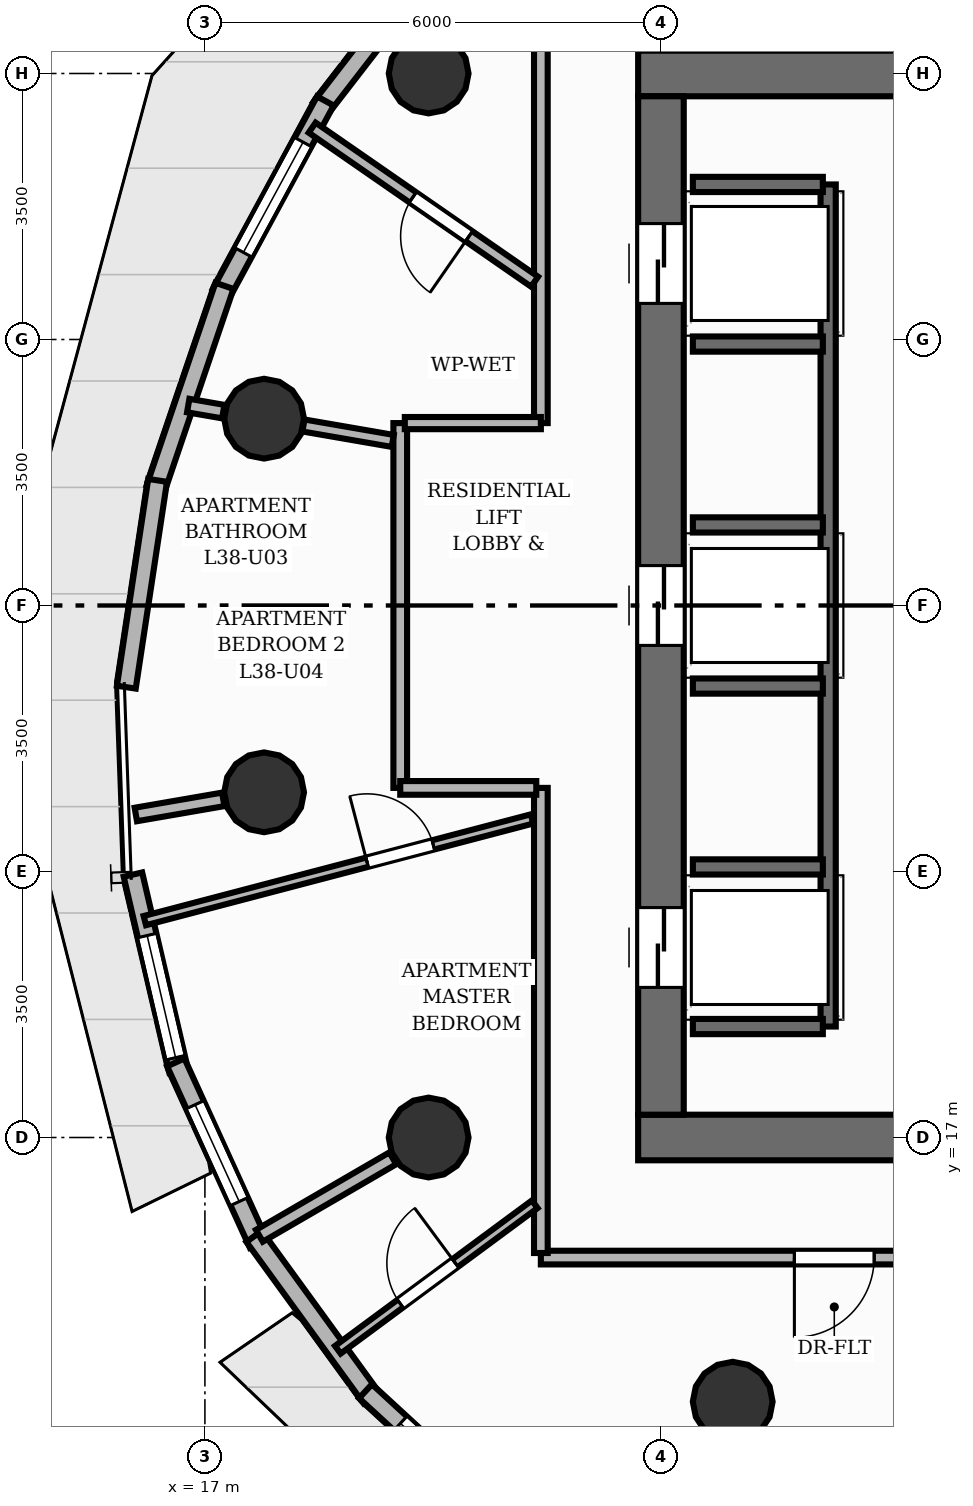
"""IFC4 building model, lengths in metres.
Left out: names, types, materials, properties, quantities, classifications, styles, units other than length and angle.
Written with IfcOpenShell. Run it as: python <this file> out.ifc"""

import sys

from ifc_helpers import new_model, si_unit, direction, frame, frame_2d, origin, origin_2d, place, context, subcontext, project, spatial, rectangle, circle, extrude, element, fill, save


model = new_model("IFC4")
c1 = context("Model", 3, precision=1e-05, world=origin(), true_north=direction((0.0, 1.0)))
c2 = subcontext(c1, "Body", "Model", "MODEL_VIEW")
j1 = project(units=[si_unit("LENGTHUNIT", "METRE"), si_unit("PLANEANGLEUNIT", "RADIAN")], contexts=[c1])
p1 = place(None, origin())
s1 = spatial("IfcSite", under=j1, at=p1, CompositionType="ELEMENT")
p2 = place(p1, origin())
s2 = spatial("IfcBuilding", under=s1, at=p2, CompositionType="ELEMENT")
p3 = place(p2, frame((0.0, 0.0, 129.76)))
s3 = spatial("IfcBuildingStorey", under=s2, at=p3, CompositionType="ELEMENT", Elevation=129.76)
p4 = place(p3, frame((22.7, 17.0, 0.0), z_axis=(0.0, 0.0, 1.0), x_axis=(1.0, 0.0, 0.0)))
e1 = element("IfcWall", 1, at=p4, inside=s3, PredefinedType="SHEAR", context=c2, shape_type="SweptSolid", body=[
    extrude(rectangle(XDim=15.1, YDim=0.6, at=frame_2d((7.55, 0.0))), origin(), (0.0, 0.0, 1.0), 3.2),
])
p5 = place(p4, frame((5.8, 0.0, 0.0)))
e2 = element("IfcOpeningElement", 2, at=p5, cuts=e1, PredefinedType="OPENING", context=c2, shape_type="SweptSolid", body=[
    extrude(rectangle(XDim=1.1, YDim=2.15, at=frame_2d((0.55, 1.075))), frame((0.0, 0.31, 0.0), z_axis=(0.0, -1.0, 0.0), x_axis=(1.0, 0.0, 0.0)), (0.0, 0.0, 1.0), 0.62),
])
p6 = place(p4, frame((9.35, 0.0, 0.0)))
e3 = element("IfcOpeningElement", 3, at=p6, cuts=e1, PredefinedType="OPENING", context=c2, shape_type="SweptSolid", body=[
    extrude(rectangle(XDim=0.9, YDim=2.1, at=frame_2d((0.45, 1.05))), frame((0.0, 0.31, 0.0), z_axis=(0.0, -1.0, 0.0), x_axis=(1.0, 0.0, 0.0)), (0.0, 0.0, 1.0), 0.62),
])
p7 = place(p3, frame((22.7, 31.0, 0.0), z_axis=(0.0, 0.0, 1.0), x_axis=(1.0, 0.0, 0.0)))
e4 = element("IfcWall", 4, at=p7, inside=s3, PredefinedType="SHEAR", context=c2, shape_type="SweptSolid", body=[
    extrude(rectangle(XDim=15.1, YDim=0.6, at=frame_2d((7.55, 0.0))), origin(), (0.0, 0.0, 1.0), 3.2),
])
p8 = place(p7, frame((11.7, 0.0, 0.0)))
e5 = element("IfcOpeningElement", 5, at=p8, cuts=e4, PredefinedType="OPENING", context=c2, shape_type="SweptSolid", body=[
    extrude(rectangle(XDim=1.1, YDim=2.15, at=frame_2d((0.55, 1.075))), frame((0.0, 0.31, 0.0), z_axis=(0.0, -1.0, 0.0), x_axis=(1.0, 0.0, 0.0)), (0.0, 0.0, 1.0), 0.62),
])
p9 = place(p3, frame((23.0, 17.3, 0.0), z_axis=(0.0, 0.0, 1.0), x_axis=(0.0, 1.0, 0.0)))
e6 = element("IfcWall", 6, at=p9, inside=s3, PredefinedType="SHEAR", context=c2, shape_type="SweptSolid", body=[
    extrude(rectangle(XDim=13.4, YDim=0.6, at=frame_2d((6.7, 0.0))), origin(), (0.0, 0.0, 1.0), 3.2),
])
p10 = place(p9, frame((1.675, 0.0, 0.0)))
e7 = element("IfcOpeningElement", 7, at=p10, cuts=e6, PredefinedType="OPENING", context=c2, shape_type="SweptSolid", body=[
    extrude(rectangle(XDim=1.05, YDim=2.15, at=frame_2d((0.525, 1.075))), frame((0.0, 0.31, 0.0), z_axis=(0.0, -1.0, 0.0), x_axis=(1.0, 0.0, 0.0)), (0.0, 0.0, 1.0), 0.62),
])
p11 = place(p9, frame((6.175, 0.0, 0.0)))
e8 = element("IfcOpeningElement", 8, at=p11, cuts=e6, PredefinedType="OPENING", context=c2, shape_type="SweptSolid", body=[
    extrude(rectangle(XDim=1.05, YDim=2.15, at=frame_2d((0.525, 1.075))), frame((0.0, 0.31, 0.0), z_axis=(0.0, -1.0, 0.0), x_axis=(1.0, 0.0, 0.0)), (0.0, 0.0, 1.0), 0.62),
])
p12 = place(p9, frame((10.675, 0.0, 0.0)))
e9 = element("IfcOpeningElement", 9, at=p12, cuts=e6, PredefinedType="OPENING", context=c2, shape_type="SweptSolid", body=[
    extrude(rectangle(XDim=1.05, YDim=2.15, at=frame_2d((0.525, 1.075))), frame((0.0, 0.31, 0.0), z_axis=(0.0, -1.0, 0.0), x_axis=(1.0, 0.0, 0.0)), (0.0, 0.0, 1.0), 0.62),
])
for number, where, z_axis, x_axis in (
    (10, (19.944, 31.0, 0.0), (0.0, 0.0, 1.0), (1.0, 0.0, 0.0)),
    (11, (17.779, 26.458, 0.0), (0.0, 0.0, 1.0), (1.0, 0.0, 0.0)),
    (12, (17.779, 21.542, 0.0), (0.0, 0.0, 1.0), (1.0, 0.0, 0.0)),
    (13, (19.944, 17.0, 0.0), (0.0, 0.0, 1.0), (1.0, 0.0, 0.0)),
    (14, (23.944, 13.523, 0.0), (0.0, 0.0, 1.0), (1.0, 0.0, 0.0)),
):
    element("IfcColumn", number, at=place(p3, frame(where, z_axis=z_axis, x_axis=x_axis)), inside=s3, PredefinedType="COLUMN", context=c2, shape_type="SweptSolid", body=[
        extrude(circle(Radius=0.525, at=origin_2d()), origin(), (0.0, 0.0, 1.0), 3.2),
    ])
p13 = place(p3, frame((18.525, 30.546, 0.0), z_axis=(0.0, 0.0, 1.0), x_axis=(0.611416743811, 0.791308767415, 0.0)))
e15 = element("IfcWall", 15, at=p13, inside=s3, PredefinedType="SOLIDWALL", context=c2, shape_type="SweptSolid", body=[
    extrude(rectangle(XDim=2.937, YDim=0.25, at=frame_2d((1.468, 0.0))), origin(), (0.0, 0.0, 1.0), 2.96),
])
p14 = place(p3, frame((17.213, 28.104, 0.0), z_axis=(0.0, 0.0, 1.0), x_axis=(0.476018404115, 0.879435318226, 0.0)))
e16 = element("IfcWall", 16, at=p14, inside=s3, PredefinedType="SOLIDWALL", context=c2, shape_type="SweptSolid", body=[
    extrude(rectangle(XDim=2.882, YDim=0.25, at=frame_2d((1.441, 0.0))), origin(), (0.0, 0.0, 1.0), 2.96),
])
p15 = place(p14, frame((0.616, 0.0, 0.85)))
e17 = element("IfcOpeningElement", 17, at=p15, cuts=e16, PredefinedType="OPENING", context=c2, shape_type="SweptSolid", body=[
    extrude(rectangle(XDim=1.65, YDim=1.55, at=frame_2d((0.825, 0.775))), frame((0.0, 0.135, 0.0), z_axis=(0.0, -1.0, 0.0), x_axis=(1.0, 0.0, 0.0)), (0.0, 0.0, 1.0), 0.27),
])
p16 = place(p3, frame((16.351, 25.538, 0.0), z_axis=(0.0, 0.0, 1.0), x_axis=(0.321473951892, 0.946918422175, 0.0)))
e18 = element("IfcWall", 18, at=p16, inside=s3, PredefinedType="SOLIDWALL", context=c2, shape_type="SweptSolid", body=[
    extrude(rectangle(XDim=2.818, YDim=0.25, at=frame_2d((1.409, 0.0))), origin(), (0.0, 0.0, 1.0), 2.96),
])
p17 = place(p3, frame((15.966, 22.925, 0.0), z_axis=(0.0, 0.0, 1.0), x_axis=(0.149576734229, 0.988750120393, 0.0)))
e19 = element("IfcWall", 19, at=p17, inside=s3, PredefinedType="SOLIDWALL", context=c2, shape_type="SweptSolid", body=[
    extrude(rectangle(XDim=2.752, YDim=0.25, at=frame_2d((1.376, 0.0))), origin(), (0.0, 0.0, 1.0), 2.96),
])
p18 = place(p3, frame((16.654, 17.88, 0.0), z_axis=(0.0, 0.0, 1.0), x_axis=(-0.226865331245, 0.973926137589, 0.0)))
e20 = element("IfcWall", 20, at=p18, inside=s3, PredefinedType="SOLIDWALL", context=c2, shape_type="SweptSolid", body=[
    extrude(rectangle(XDim=2.648, YDim=0.25, at=frame_2d((1.324, 0.0))), origin(), (0.0, 0.0, 1.0), 2.96),
])
p19 = place(p18, frame((0.175, 0.0, 0.85)))
e21 = element("IfcOpeningElement", 21, at=p19, cuts=e20, PredefinedType="OPENING", context=c2, shape_type="SweptSolid", body=[
    extrude(rectangle(XDim=1.65, YDim=1.55, at=frame_2d((0.825, 0.775))), frame((0.0, 0.135, 0.0), z_axis=(0.0, -1.0, 0.0), x_axis=(1.0, 0.0, 0.0)), (0.0, 0.0, 1.0), 0.27),
])
p20 = place(p3, frame((17.705, 15.6, 0.0), z_axis=(0.0, 0.0, 1.0), x_axis=(-0.41458087789, 0.910012470073, 0.0)))
e22 = element("IfcWall", 22, at=p20, inside=s3, PredefinedType="SOLIDWALL", context=c2, shape_type="SweptSolid", body=[
    extrude(rectangle(XDim=2.624, YDim=0.25, at=frame_2d((1.312, 0.0))), origin(), (0.0, 0.0, 1.0), 2.96),
])
p21 = place(p20, frame((0.612, 0.0, 0.85)))
e23 = element("IfcOpeningElement", 23, at=p21, cuts=e22, PredefinedType="OPENING", context=c2, shape_type="SweptSolid", body=[
    extrude(rectangle(XDim=1.4, YDim=1.55, at=frame_2d((0.7, 0.775))), frame((0.0, 0.135, 0.0), z_axis=(0.0, -1.0, 0.0), x_axis=(1.0, 0.0, 0.0)), (0.0, 0.0, 1.0), 0.27),
])
p22 = place(p3, frame((19.189, 13.576, 0.0), z_axis=(0.0, 0.0, 1.0), x_axis=(-0.587574137145, 0.80917033643, 0.0)))
e24 = element("IfcWall", 24, at=p22, inside=s3, PredefinedType="SOLIDWALL", context=c2, shape_type="SweptSolid", body=[
    extrude(rectangle(XDim=2.624, YDim=0.25, at=frame_2d((1.312, 0.0))), origin(), (0.0, 0.0, 1.0), 2.96),
])
p23 = place(p3, frame((21.061, 11.868, 0.0), z_axis=(0.0, 0.0, 1.0), x_axis=(-0.73572884951, 0.677276206579, 0.0)))
e25 = element("IfcWall", 25, at=p23, inside=s3, PredefinedType="SOLIDWALL", context=c2, shape_type="SweptSolid", body=[
    extrude(rectangle(XDim=2.648, YDim=0.25, at=frame_2d((1.324, 0.0))), origin(), (0.0, 0.0, 1.0), 2.96),
])
p24 = place(p23, frame((0.624, 0.0, 0.85)))
e26 = element("IfcOpeningElement", 26, at=p24, cuts=e25, PredefinedType="OPENING", context=c2, shape_type="SweptSolid", body=[
    extrude(rectangle(XDim=1.4, YDim=1.55, at=frame_2d((0.7, 0.775))), frame((0.0, 0.135, 0.0), z_axis=(0.0, -1.0, 0.0), x_axis=(1.0, 0.0, 0.0)), (0.0, 0.0, 1.0), 0.27),
])
p25 = place(p3, frame((25.2, 18.46, 0.0), z_axis=(0.0, 0.0, 1.0), x_axis=(0.0, 1.0, 0.0)))
e27 = element("IfcWall", 27, at=p25, inside=s3, PredefinedType="SHEAR", context=c2, shape_type="SweptSolid", body=[
    extrude(rectangle(XDim=11.08, YDim=0.2, at=frame_2d((5.54, 0.0))), origin(), (0.0, 0.0, 1.0), 3.2),
])
for number, where, z_axis, x_axis in (
    (28, (23.42, 18.46, 0.0), (0.0, 0.0, 1.0), (1.0, 0.0, 0.0)),
    (29, (23.42, 29.54, 0.0), (0.0, 0.0, 1.0), (1.0, 0.0, 0.0)),
    (30, (23.42, 20.56, 0.0), (0.0, 0.0, 1.0), (1.0, 0.0, 0.0)),
    (31, (23.42, 22.94, 0.0), (0.0, 0.0, 1.0), (1.0, 0.0, 0.0)),
    (32, (23.42, 25.06, 0.0), (0.0, 0.0, 1.0), (1.0, 0.0, 0.0)),
    (33, (23.42, 27.44, 0.0), (0.0, 0.0, 1.0), (1.0, 0.0, 0.0)),
):
    element("IfcWall", number, at=place(p3, frame(where, z_axis=z_axis, x_axis=x_axis)), inside=s3, PredefinedType="SHEAR", context=c2, shape_type="SweptSolid", body=[
        extrude(rectangle(XDim=1.71, YDim=0.2, at=frame_2d((0.855, 0.0))), origin(), (0.0, 0.0, 1.0), 3.2),
    ])
p26 = place(p3, frame((17.242, 26.551, 0.0), z_axis=(0.0, 0.0, 1.0), x_axis=(-0.985345448397, 0.170570651999, 0.0)))
e34 = element("IfcWall", 34, at=p26, inside=s3, PredefinedType="PARTITIONING", context=c2, shape_type="SweptSolid", body=[
    extrude(rectangle(XDim=0.468, YDim=0.18, at=frame_2d((0.234, 0.0))), origin(), (0.0, 0.0, 1.0), 2.336),
])
p27 = place(p3, frame((17.242, 21.449, 0.0), z_axis=(0.0, 0.0, 1.0), x_axis=(-0.98537549431, -0.170396992969, 0.0)))
e35 = element("IfcWall", 35, at=p27, inside=s3, PredefinedType="PARTITIONING", context=c2, shape_type="SweptSolid", body=[
    extrude(rectangle(XDim=1.168, YDim=0.18, at=frame_2d((0.584, 0.0))), origin(), (0.0, 0.0, 1.0), 2.336),
])
p28 = place(p3, frame((19.472, 16.726, 0.0), z_axis=(0.0, 0.0, 1.0), x_axis=(-0.86481084581, -0.502097800203, 0.0)))
e36 = element("IfcWall", 36, at=p28, inside=s3, PredefinedType="PARTITIONING", context=c2, shape_type="SweptSolid", body=[
    extrude(rectangle(XDim=2.03, YDim=0.18, at=frame_2d((1.015, 0.0))), origin(), (0.0, 0.0, 1.0), 2.336),
])
p29 = place(p3, frame((21.42, 26.4, 0.0), z_axis=(0.0, 0.0, 1.0), x_axis=(0.0, 1.0, 0.0)))
e37 = element("IfcWall", 37, at=p29, inside=s3, PredefinedType="PARTITIONING", context=c2, shape_type="SweptSolid", body=[
    extrude(rectangle(XDim=6.12, YDim=0.18, at=frame_2d((3.06, 0.0))), origin(), (0.0, 0.0, 1.0), 2.955),
])
p30 = place(p3, frame((19.57, 21.6, 0.0), z_axis=(0.0, 0.0, 1.0), x_axis=(0.0, 1.0, 0.0)))
e38 = element("IfcWall", 38, at=p30, inside=s3, PredefinedType="PARTITIONING", context=c2, shape_type="SweptSolid", body=[
    extrude(rectangle(XDim=4.8, YDim=0.18, at=frame_2d((2.4, 0.0))), origin(), (0.0, 0.0, 1.0), 2.955),
])
p31 = place(p3, frame((19.63, 26.4, 0.0), z_axis=(0.0, 0.0, 1.0), x_axis=(1.0, 0.0, 0.0)))
e39 = element("IfcWall", 39, at=p31, inside=s3, PredefinedType="PLUMBINGWALL", context=c2, shape_type="SweptSolid", body=[
    extrude(rectangle(XDim=1.79, YDim=0.16, at=frame_2d((0.895, 0.0))), origin(), (0.0, 0.0, 1.0), 2.955),
])
p32 = place(p3, frame((29.141, 15.42, 0.0), z_axis=(0.0, 0.0, 1.0), x_axis=(-1.0, 0.0, 0.0)))
e40 = element("IfcWall", 40, at=p32, inside=s3, PredefinedType="PARTITIONING", context=c2, shape_type="SweptSolid", body=[
    extrude(rectangle(XDim=7.721, YDim=0.18, at=frame_2d((3.861, 0.0))), origin(), (0.0, 0.0, 1.0), 2.955),
])
p33 = place(p32, frame((3.336, 0.0, 0.0)))
e41 = element("IfcOpeningElement", 41, at=p33, cuts=e40, PredefinedType="OPENING", context=c2, shape_type="SweptSolid", body=[
    extrude(rectangle(XDim=1.05, YDim=2.15, at=frame_2d((0.525, 1.075))), frame((0.0, 0.1, 0.0), z_axis=(0.0, -1.0, 0.0), x_axis=(1.0, 0.0, 0.0)), (0.0, 0.0, 1.0), 0.2),
])
p34 = place(p3, frame((21.42, 15.48, 0.0), z_axis=(0.0, 0.0, 1.0), x_axis=(0.0, 1.0, 0.0)))
e42 = element("IfcWall", 42, at=p34, inside=s3, PredefinedType="PARTITIONING", context=c2, shape_type="SweptSolid", body=[
    extrude(rectangle(XDim=6.12, YDim=0.18, at=frame_2d((3.06, 0.0))), origin(), (0.0, 0.0, 1.0), 2.955),
])
p35 = place(p3, frame((21.36, 21.6, 0.0), z_axis=(0.0, 0.0, 1.0), x_axis=(-1.0, 0.0, 0.0)))
e43 = element("IfcWall", 43, at=p35, inside=s3, PredefinedType="PARTITIONING", context=c2, shape_type="SweptSolid", body=[
    extrude(rectangle(XDim=1.79, YDim=0.18, at=frame_2d((0.895, 0.0))), origin(), (0.0, 0.0, 1.0), 2.336),
])
p36 = place(p3, frame((21.338, 28.26, 0.0), z_axis=(0.0, 0.0, 1.0), x_axis=(-0.822095882312, 0.569349067168, 0.0)))
e44 = element("IfcWall", 44, at=p36, inside=s3, PredefinedType="PLUMBINGWALL", context=c2, shape_type="SweptSolid", body=[
    extrude(rectangle(XDim=3.56, YDim=0.16, at=frame_2d((1.78, 0.0))), origin(), (0.0, 0.0, 1.0), 2.692),
])
p37 = place(p36, frame((1.05, 0.0, 0.0)))
e45 = element("IfcOpeningElement", 45, at=p37, cuts=e44, PredefinedType="OPENING", context=c2, shape_type="SweptSolid", body=[
    extrude(rectangle(XDim=0.9, YDim=2.1, at=frame_2d((0.45, 1.05))), frame((0.0, 0.09, 0.0), z_axis=(0.0, -1.0, 0.0), x_axis=(1.0, 0.0, 0.0)), (0.0, 0.0, 1.0), 0.18),
])
p38 = place(p3, frame((19.471, 26.166, 0.0), z_axis=(0.0, 0.0, 1.0), x_axis=(-0.985385550807, 0.170338827815, 0.0)))
e46 = element("IfcWall", 46, at=p38, inside=s3, PredefinedType="PLUMBINGWALL", context=c2, shape_type="SweptSolid", body=[
    extrude(rectangle(XDim=1.192, YDim=0.16, at=frame_2d((0.596, 0.0))), origin(), (0.0, 0.0, 1.0), 2.336),
])
p39 = place(p3, frame((29.068, 15.335, 0.0), z_axis=(0.0, 0.0, 1.0), x_axis=(-0.534879638081, -0.844928264864, 0.0)))
e47 = element("IfcWall", 47, at=p39, inside=s3, PredefinedType="PLUMBINGWALL", context=c2, shape_type="SweptSolid", body=[
    extrude(rectangle(XDim=6.669, YDim=0.16, at=frame_2d((3.335, 0.0))), origin(), (0.0, 0.0, 1.0), 2.692),
])
p40 = place(p39, frame((2.885, 0.0, 0.0)))
e48 = element("IfcOpeningElement", 48, at=p40, cuts=e47, PredefinedType="OPENING", context=c2, shape_type="SweptSolid", body=[
    extrude(rectangle(XDim=0.9, YDim=2.1, at=frame_2d((0.45, 1.05))), frame((0.0, 0.09, 0.0), z_axis=(0.0, -1.0, 0.0), x_axis=(1.0, 0.0, 0.0)), (0.0, 0.0, 1.0), 0.18),
])
p41 = place(p3, frame((18.749, 14.207, 0.0), z_axis=(0.0, 0.0, 1.0), x_axis=(0.804182442208, 0.594382536456, 0.0)))
e49 = element("IfcWall", 49, at=p41, inside=s3, PredefinedType="PARTITIONING", context=c2, shape_type="SweptSolid", body=[
    extrude(rectangle(XDim=3.221, YDim=0.125, at=frame_2d((1.611, 0.0))), origin(), (0.0, 0.0, 1.0), 2.955),
])
p42 = place(p41, frame((1.021, 0.0, 0.0)))
e50 = element("IfcOpeningElement", 50, at=p42, cuts=e49, PredefinedType="OPENING", context=c2, shape_type="SweptSolid", body=[
    extrude(rectangle(XDim=0.9, YDim=2.1, at=frame_2d((0.45, 1.05))), frame((0.0, 0.073, 0.0), z_axis=(0.0, -1.0, 0.0), x_axis=(1.0, 0.0, 0.0)), (0.0, 0.0, 1.0), 0.145),
])
p43 = place(p3, frame((16.209, 19.854, 0.0), z_axis=(0.0, 0.0, 1.0), x_axis=(0.967214885104, 0.253959378707, 0.0)))
e51 = element("IfcWall", 51, at=p43, inside=s3, PredefinedType="PARTITIONING", context=c2, shape_type="SweptSolid", body=[
    extrude(rectangle(XDim=5.267, YDim=0.125, at=frame_2d((2.634, 0.0))), origin(), (0.0, 0.0, 1.0), 2.955),
])
p44 = place(p43, frame((3.024, 0.0, 0.0)))
e52 = element("IfcOpeningElement", 52, at=p44, cuts=e51, PredefinedType="OPENING", context=c2, shape_type="SweptSolid", body=[
    extrude(rectangle(XDim=0.9, YDim=2.1, at=frame_2d((0.45, 1.05))), frame((0.0, 0.073, 0.0), z_axis=(0.0, -1.0, 0.0), x_axis=(1.0, 0.0, 0.0)), (0.0, 0.0, 1.0), 0.145),
])
p45 = place(p15, origin())
e53 = element("IfcWindow", 53, at=p45, inside=s3, PartitioningType="SINGLE_PANEL", PredefinedType="WINDOW", context=c2, shape_type="SweptSolid", body=[
    extrude(rectangle(XDim=1.65, YDim=1.55, at=frame_2d((0.825, 0.775))), frame((0.0, 0.03, 0.0), z_axis=(0.0, -1.0, 0.0), x_axis=(1.0, 0.0, 0.0)), (0.0, 0.0, 1.0), 0.06),
])
fill(e17, e53)
p46 = place(p19, origin())
e54 = element("IfcWindow", 54, at=p46, inside=s3, PartitioningType="SINGLE_PANEL", PredefinedType="WINDOW", context=c2, shape_type="SweptSolid", body=[
    extrude(rectangle(XDim=1.65, YDim=1.55, at=frame_2d((0.825, 0.775))), frame((0.0, 0.03, 0.0), z_axis=(0.0, -1.0, 0.0), x_axis=(1.0, 0.0, 0.0)), (0.0, 0.0, 1.0), 0.06),
])
fill(e21, e54)
p47 = place(p21, origin())
e55 = element("IfcWindow", 55, at=p47, inside=s3, PartitioningType="SINGLE_PANEL", PredefinedType="WINDOW", context=c2, shape_type="SweptSolid", body=[
    extrude(rectangle(XDim=1.4, YDim=1.55, at=frame_2d((0.7, 0.775))), frame((0.0, 0.03, 0.0), z_axis=(0.0, -1.0, 0.0), x_axis=(1.0, 0.0, 0.0)), (0.0, 0.0, 1.0), 0.06),
])
fill(e23, e55)
p48 = place(p24, origin())
e56 = element("IfcWindow", 56, at=p48, inside=s3, PartitioningType="SINGLE_PANEL", PredefinedType="WINDOW", context=c2, shape_type="SweptSolid", body=[
    extrude(rectangle(XDim=1.4, YDim=1.55, at=frame_2d((0.7, 0.775))), frame((0.0, 0.03, 0.0), z_axis=(0.0, -1.0, 0.0), x_axis=(1.0, 0.0, 0.0)), (0.0, 0.0, 1.0), 0.06),
])
fill(e26, e56)
p49 = place(p10, origin())
e57 = element("IfcDoor", 57, at=p49, inside=s3, OperationType="DOUBLE_DOOR_SLIDING", PredefinedType="DOOR", context=c2, shape_type="SweptSolid", body=[
    extrude(rectangle(XDim=1.05, YDim=2.15, at=frame_2d((0.525, 1.075))), frame((0.0, 0.025, 0.0), z_axis=(0.0, -1.0, 0.0), x_axis=(1.0, 0.0, 0.0)), (0.0, 0.0, 1.0), 0.05),
])
fill(e7, e57)
p50 = place(p11, origin())
e58 = element("IfcDoor", 58, at=p50, inside=s3, OperationType="DOUBLE_DOOR_SLIDING", PredefinedType="DOOR", context=c2, shape_type="SweptSolid", body=[
    extrude(rectangle(XDim=1.05, YDim=2.15, at=frame_2d((0.525, 1.075))), frame((0.0, 0.025, 0.0), z_axis=(0.0, -1.0, 0.0), x_axis=(1.0, 0.0, 0.0)), (0.0, 0.0, 1.0), 0.05),
])
fill(e8, e58)
p51 = place(p12, origin())
e59 = element("IfcDoor", 59, at=p51, inside=s3, OperationType="DOUBLE_DOOR_SLIDING", PredefinedType="DOOR", context=c2, shape_type="SweptSolid", body=[
    extrude(rectangle(XDim=1.05, YDim=2.15, at=frame_2d((0.525, 1.075))), frame((0.0, 0.025, 0.0), z_axis=(0.0, -1.0, 0.0), x_axis=(1.0, 0.0, 0.0)), (0.0, 0.0, 1.0), 0.05),
])
fill(e9, e59)
p52 = place(p37, origin())
e60 = element("IfcDoor", 60, at=p52, inside=s3, OperationType="SINGLE_SWING_LEFT", PredefinedType="DOOR", context=c2, shape_type="SweptSolid", body=[
    extrude(rectangle(XDim=0.9, YDim=2.1, at=frame_2d((0.45, 1.05))), frame((0.0, 0.025, 0.0), z_axis=(0.0, -1.0, 0.0), x_axis=(1.0, 0.0, 0.0)), (0.0, 0.0, 1.0), 0.05),
])
fill(e45, e60)
p53 = place(p33, origin())
e61 = element("IfcDoor", 61, at=p53, inside=s3, OperationType="SINGLE_SWING_RIGHT", PredefinedType="DOOR", context=c2, shape_type="SweptSolid", body=[
    extrude(rectangle(XDim=1.05, YDim=2.15, at=frame_2d((0.525, 1.075))), frame((0.0, 0.025, 0.0), z_axis=(0.0, -1.0, 0.0), x_axis=(1.0, 0.0, 0.0)), (0.0, 0.0, 1.0), 0.05),
])
fill(e41, e61)
p54 = place(p42, origin())
e62 = element("IfcDoor", 62, at=p54, inside=s3, OperationType="SINGLE_SWING_RIGHT", PredefinedType="DOOR", context=c2, shape_type="SweptSolid", body=[
    extrude(rectangle(XDim=0.9, YDim=2.1, at=frame_2d((0.45, 1.05))), frame((0.0, 0.025, 0.0), z_axis=(0.0, -1.0, 0.0), x_axis=(1.0, 0.0, 0.0)), (0.0, 0.0, 1.0), 0.05),
])
fill(e50, e62)
p55 = place(p44, origin())
e63 = element("IfcDoor", 63, at=p55, inside=s3, OperationType="SINGLE_SWING_LEFT", PredefinedType="DOOR", context=c2, shape_type="SweptSolid", body=[
    extrude(rectangle(XDim=0.9, YDim=2.1, at=frame_2d((0.45, 1.05))), frame((0.0, 0.025, 0.0), z_axis=(0.0, -1.0, 0.0), x_axis=(1.0, 0.0, 0.0)), (0.0, 0.0, 1.0), 0.05),
])
fill(e52, e63)
save(model, sys.argv[1])
